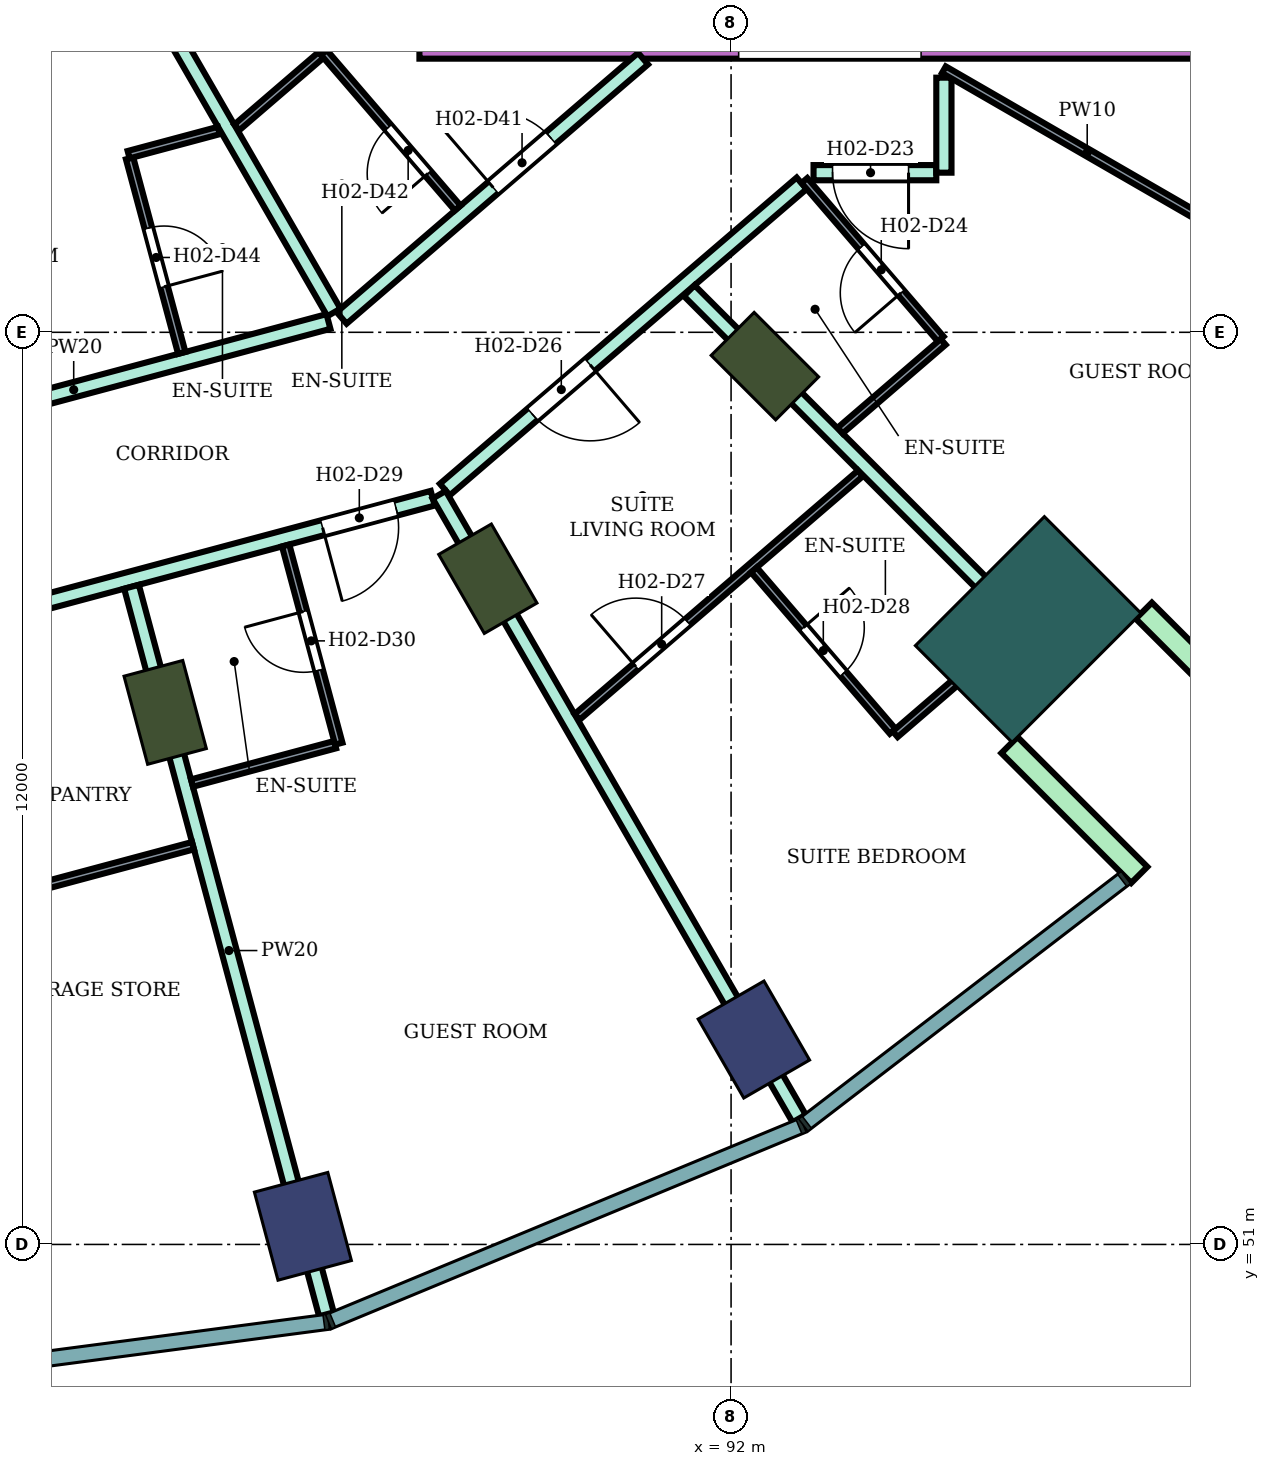
"""IFC4 building model, lengths in metres.
Left out: names, types, materials, properties, quantities, classifications, styles, units other than length and angle.
Written with IfcOpenShell. Run it as: python <this file> out.ifc"""

import sys

from ifc_helpers import new_model, si_unit, direction, frame, frame_2d, origin, origin_2d, place, context, subcontext, project, spatial, rectangle, extrude, element, fill, save


model = new_model("IFC4")
c1 = context("Model", 3, precision=1e-05, world=origin(), true_north=direction((0.0, 1.0)))
c2 = subcontext(c1, "Body", "Model", "MODEL_VIEW")
j1 = project(units=[si_unit("LENGTHUNIT", "METRE"), si_unit("PLANEANGLEUNIT", "RADIAN")], contexts=[c1])
p1 = place(None, origin())
s1 = spatial("IfcSite", under=j1, at=p1, CompositionType="ELEMENT")
p2 = place(p1, origin())
s2 = spatial("IfcBuilding", under=s1, at=p2, CompositionType="ELEMENT")
p3 = place(p2, frame((0.0, 0.0, 44.0)))
s3 = spatial("IfcBuildingStorey", under=s2, at=p3, CompositionType="ELEMENT", Elevation=44.0)
for number, where, z_axis, x_axis in (
    (1, (86.367, 51.238, 0.0), (0.0, 0.0, 1.0), (0.259, -0.966, 0.0)),
    (2, (92.3, 53.696, 0.0), (0.0, 0.0, 1.0), (0.5, -0.866, 0.0)),
):
    element("IfcColumn", number, at=place(p3, frame(where, z_axis=z_axis, x_axis=x_axis)), inside=s3, PredefinedType="COLUMN", context=c2, shape_type="SweptSolid", body=[
        extrude(rectangle(XDim=1.2, YDim=1.0, at=origin_2d()), origin(), (0.0, 0.0, 1.0), 3.8),
    ])
for number, where, z_axis, x_axis in (
    (3, (84.555, 58.0, 0.0), (0.0, 0.0, 1.0), (0.259, -0.966, 0.0)),
    (4, (88.8, 59.758, 0.0), (0.0, 0.0, 1.0), (0.5, -0.866, 0.0)),
    (5, (92.445, 62.555, 0.0), (0.0, 0.0, 1.0), (0.707, -0.707, 0.0)),
):
    element("IfcColumn", number, at=place(p3, frame(where, z_axis=z_axis, x_axis=x_axis)), inside=s3, PredefinedType="COLUMN", context=c2, shape_type="SweptSolid", body=[
        extrude(rectangle(XDim=1.2, YDim=0.8, at=origin_2d()), origin(), (0.0, 0.0, 1.0), 3.8),
    ])
p4 = place(p3, frame((95.91, 59.09, 0.0), z_axis=(0.0, 0.0, 1.0), x_axis=(0.707106781187, -0.707106781187, 0.0)))
e6 = element("IfcColumn", 6, at=p4, inside=s3, PredefinedType="COLUMN", context=c2, shape_type="SweptSolid", body=[
    extrude(rectangle(XDim=1.8, YDim=2.4, at=origin_2d()), origin(), (0.0, 0.0, 1.0), 3.8),
])
p5 = place(p3, frame((87.9, 67.0, 0.0), z_axis=(0.0, 0.0, 1.0), x_axis=(1.0, 0.0, 0.0)))
e7 = element("IfcWall", 7, at=p5, inside=s3, PredefinedType="SHEAR", context=c2, shape_type="SweptSolid", body=[
    extrude(rectangle(XDim=14.7, YDim=0.8, at=frame_2d((7.35, 0.0))), origin(), (0.0, 0.0, 1.0), 3.48),
])
p6 = place(p5, frame((4.2, 0.0, 0.0)))
e8 = element("IfcOpeningElement", 8, at=p6, cuts=e7, PredefinedType="OPENING", context=c2, shape_type="SweptSolid", body=[
    extrude(rectangle(XDim=2.4, YDim=2.4, at=frame_2d((1.2, 1.2))), frame((0.0, 0.41, 0.0), z_axis=(0.0, -1.0, 0.0), x_axis=(1.0, 0.0, 0.0)), (0.0, 0.0, 1.0), 0.82),
])
for number, where, z_axis, x_axis in (
    (9, (95.662, 57.57, 0.0), (0.0, 0.0, 1.0), (0.707, -0.707, 0.0)),
    (10, (97.43, 59.338, 0.0), (0.0, 0.0, 1.0), (0.707, -0.707, 0.0)),
):
    element("IfcWall", number, at=place(p3, frame(where, z_axis=z_axis, x_axis=x_axis)), inside=s3, PredefinedType="NOTDEFINED", context=c2, shape_type="SweptSolid", body=[
        extrude(rectangle(XDim=2.416, YDim=0.3, at=frame_2d((1.208, 0.0))), origin(), (0.0, 0.0, 1.0), 3.8),
    ])
p7 = place(p3, frame((80.0, 58.655, 0.0), z_axis=(0.0, 0.0, 1.0), x_axis=(0.965967338894, 0.258664068224, 0.0)))
e11 = element("IfcWall", 11, at=p7, inside=s3, PredefinedType="PARTITIONING", context=c2, shape_type="SweptSolid", body=[
    extrude(rectangle(XDim=8.36, YDim=0.2, at=frame_2d((4.18, 0.0))), origin(), (0.0, 0.0, 1.0), 3.35),
])
p8 = place(p7, frame((6.86, 0.0, 0.0)))
e12 = element("IfcOpeningElement", 12, at=p8, cuts=e11, PredefinedType="OPENING", context=c2, shape_type="SweptSolid", body=[
    extrude(rectangle(XDim=1.0, YDim=2.1, at=frame_2d((0.5, 1.05))), frame((0.0, 0.11, 0.0), z_axis=(0.0, -1.0, 0.0), x_axis=(1.0, 0.0, 0.0)), (0.0, 0.0, 1.0), 0.22),
])
p9 = place(p7, frame((1.675, 0.0, 0.0)))
e13 = element("IfcOpeningElement", 13, at=p9, cuts=e11, PredefinedType="OPENING", context=c2, shape_type="SweptSolid", body=[
    extrude(rectangle(XDim=0.9, YDim=2.1, at=frame_2d((0.45, 1.05))), frame((0.0, 0.11, 0.0), z_axis=(0.0, -1.0, 0.0), x_axis=(1.0, 0.0, 0.0)), (0.0, 0.0, 1.0), 0.22),
])
p10 = place(p3, frame((80.0, 61.346, 0.0), z_axis=(0.0, 0.0, 1.0), x_axis=(0.965924181808, 0.258825182312, 0.0)))
e14 = element("IfcWall", 14, at=p10, inside=s3, PredefinedType="PARTITIONING", context=c2, shape_type="SweptSolid", body=[
    extrude(rectangle(XDim=6.94, YDim=0.2, at=frame_2d((3.47, 0.0))), origin(), (0.0, 0.0, 1.0), 3.35),
])
p11 = place(p10, frame((0.55, 0.0, 0.0)))
e15 = element("IfcOpeningElement", 15, at=p11, cuts=e14, PredefinedType="OPENING", context=c2, shape_type="SweptSolid", body=[
    extrude(rectangle(XDim=1.0, YDim=2.1, at=frame_2d((0.5, 1.05))), frame((0.0, 0.11, 0.0), z_axis=(0.0, -1.0, 0.0), x_axis=(1.0, 0.0, 0.0)), (0.0, 0.0, 1.0), 0.22),
])
p12 = place(p3, frame((83.848, 68.332, 0.0), z_axis=(0.0, 0.0, 1.0), x_axis=(0.499919778085, -0.866071714975, 0.0)))
e16 = element("IfcWall", 16, at=p12, inside=s3, PredefinedType="PARTITIONING", context=c2, shape_type="SweptSolid", body=[
    extrude(rectangle(XDim=5.855, YDim=0.2, at=frame_2d((2.927, 0.0))), origin(), (0.0, 0.0, 1.0), 3.35),
])
p13 = place(p3, frame((84.112, 59.652, 0.0), z_axis=(0.0, 0.0, 1.0), x_axis=(0.258791091927, -0.965933315886, 0.0)))
e17 = element("IfcWall", 17, at=p13, inside=s3, PredefinedType="PARTITIONING", context=c2, shape_type="SweptSolid", body=[
    extrude(rectangle(XDim=9.909, YDim=0.2, at=frame_2d((4.955, 0.0))), origin(), (0.0, 0.0, 1.0), 3.35),
])
p14 = place(p3, frame((86.877, 63.189, 0.0), z_axis=(0.0, 0.0, 1.0), x_axis=(0.758164888471, 0.652062881853, 0.0)))
e18 = element("IfcWall", 18, at=p14, inside=s3, PredefinedType="PARTITIONING", context=c2, shape_type="SweptSolid", body=[
    extrude(rectangle(XDim=5.23, YDim=0.2, at=frame_2d((2.615, 0.0))), origin(), (0.0, 0.0, 1.0), 3.35),
])
p15 = place(p14, frame((2.63, 0.0, 0.0)))
e19 = element("IfcOpeningElement", 19, at=p15, cuts=e18, PredefinedType="OPENING", context=c2, shape_type="SweptSolid", body=[
    extrude(rectangle(XDim=1.0, YDim=2.1, at=frame_2d((0.5, 1.05))), frame((0.0, 0.11, 0.0), z_axis=(0.0, -1.0, 0.0), x_axis=(1.0, 0.0, 0.0)), (0.0, 0.0, 1.0), 0.22),
])
p16 = place(p3, frame((88.235, 60.931, 0.0), z_axis=(0.0, 0.0, 1.0), x_axis=(0.758799498714, 0.651324282329, 0.0)))
e20 = element("IfcWall", 20, at=p16, inside=s3, PredefinedType="PARTITIONING", context=c2, shape_type="SweptSolid", body=[
    extrude(rectangle(XDim=6.186, YDim=0.2, at=frame_2d((3.093, 0.0))), origin(), (0.0, 0.0, 1.0), 3.35),
])
p17 = place(p16, frame((1.519, 0.0, 0.0)))
e21 = element("IfcOpeningElement", 21, at=p17, cuts=e20, PredefinedType="OPENING", context=c2, shape_type="SweptSolid", body=[
    extrude(rectangle(XDim=1.0, YDim=2.1, at=frame_2d((0.5, 1.05))), frame((0.0, 0.11, 0.0), z_axis=(0.0, -1.0, 0.0), x_axis=(1.0, 0.0, 0.0)), (0.0, 0.0, 1.0), 0.22),
])
p18 = place(p3, frame((88.159, 60.863, 0.0), z_axis=(0.0, 0.0, 1.0), x_axis=(0.499897184548, -0.866084756177, 0.0)))
e22 = element("IfcWall", 22, at=p18, inside=s3, PredefinedType="PARTITIONING", context=c2, shape_type="SweptSolid", body=[
    extrude(rectangle(XDim=9.475, YDim=0.2, at=frame_2d((4.737, 0.0))), origin(), (0.0, 0.0, 1.0), 3.35),
])
p19 = place(p3, frame((91.449, 63.548, 0.0), z_axis=(0.0, 0.0, 1.0), x_axis=(0.706984810649, -0.707228730688, 0.0)))
e23 = element("IfcWall", 23, at=p19, inside=s3, PredefinedType="PARTITIONING", context=c2, shape_type="SweptSolid", body=[
    extrude(rectangle(XDim=7.006, YDim=0.2, at=frame_2d((3.503, 0.0))), origin(), (0.0, 0.0, 1.0), 3.35),
])
p20 = place(p3, frame((93.085, 65.1, 0.0), z_axis=(0.0, 0.0, 1.0), x_axis=(1.0, 0.0, 0.0)))
e24 = element("IfcWall", 24, at=p20, inside=s3, PredefinedType="PARTITIONING", context=c2, shape_type="SweptSolid", body=[
    extrude(rectangle(XDim=1.615, YDim=0.2, at=frame_2d((0.808, 0.0))), origin(), (0.0, 0.0, 1.0), 3.35),
])
p21 = place(p20, frame((0.25, 0.0, 0.0)))
e25 = element("IfcOpeningElement", 25, at=p21, cuts=e24, PredefinedType="OPENING", context=c2, shape_type="SweptSolid", body=[
    extrude(rectangle(XDim=1.0, YDim=2.1, at=frame_2d((0.5, 1.05))), frame((0.0, 0.11, 0.0), z_axis=(0.0, -1.0, 0.0), x_axis=(1.0, 0.0, 0.0)), (0.0, 0.0, 1.0), 0.22),
])
p22 = place(p3, frame((94.8, 65.1, 0.0), z_axis=(0.0, 0.0, 1.0), x_axis=(0.0, 1.0, 0.0)))
e26 = element("IfcWall", 26, at=p22, inside=s3, PredefinedType="PARTITIONING", context=c2, shape_type="SweptSolid", body=[
    extrude(rectangle(XDim=1.25, YDim=0.2, at=frame_2d((0.625, 0.0))), origin(), (0.0, 0.0, 1.0), 3.35),
])
p23 = place(p3, frame((80.106, 54.956, 0.0), z_axis=(0.0, 0.0, 1.0), x_axis=(0.965910666284, 0.258875616386, 0.0)))
e27 = element("IfcWall", 27, at=p23, inside=s3, PredefinedType="PARTITIONING", context=c2, shape_type="SweptSolid", body=[
    extrude(rectangle(XDim=4.985, YDim=0.1, at=frame_2d((2.493, 0.0))), origin(), (0.0, 0.0, 1.0), 3.35),
])
p24 = place(p23, frame((2.038, 0.0, 0.0)))
e28 = element("IfcOpeningElement", 28, at=p24, cuts=e27, PredefinedType="OPENING", context=c2, shape_type="SweptSolid", body=[
    extrude(rectangle(XDim=0.9, YDim=2.1, at=frame_2d((0.45, 1.05))), frame((0.0, 0.06, 0.0), z_axis=(0.0, -1.0, 0.0), x_axis=(1.0, 0.0, 0.0)), (0.0, 0.0, 1.0), 0.12),
])
p25 = place(p3, frame((84.087, 65.289, 0.0), z_axis=(0.0, 0.0, 1.0), x_axis=(0.258929459649, -0.965896234037, 0.0)))
e29 = element("IfcWall", 29, at=p25, inside=s3, PredefinedType="PARTITIONING", context=c2, shape_type="SweptSolid", body=[
    extrude(rectangle(XDim=2.65, YDim=0.1, at=frame_2d((1.325, 0.0))), origin(), (0.0, 0.0, 1.0), 3.35),
])
p26 = place(p25, frame((0.95, 0.0, 0.0)))
e30 = element("IfcOpeningElement", 30, at=p26, cuts=e29, PredefinedType="OPENING", context=c2, shape_type="SweptSolid", body=[
    extrude(rectangle(XDim=0.8, YDim=2.1, at=frame_2d((0.4, 1.05))), frame((0.0, 0.06, 0.0), z_axis=(0.0, -1.0, 0.0), x_axis=(1.0, 0.0, 0.0)), (0.0, 0.0, 1.0), 0.12),
])
p27 = place(p3, frame((84.074, 65.337, 0.0), z_axis=(0.0, 0.0, 1.0), x_axis=(0.965914351064, 0.258861867428, 0.0)))
e31 = element("IfcWall", 31, at=p27, inside=s3, PredefinedType="PARTITIONING", context=c2, shape_type="SweptSolid", body=[
    extrude(rectangle(XDim=1.229, YDim=0.1, at=frame_2d((0.615, 0.0))), origin(), (0.0, 0.0, 1.0), 3.35),
])
p28 = place(p3, frame((84.908, 57.07, 0.0), z_axis=(0.0, 0.0, 1.0), x_axis=(0.965853538138, 0.25908867761, 0.0)))
e32 = element("IfcWall", 32, at=p28, inside=s3, PredefinedType="PARTITIONING", context=c2, shape_type="SweptSolid", body=[
    extrude(rectangle(XDim=1.95, YDim=0.1, at=frame_2d((0.975, 0.0))), origin(), (0.0, 0.0, 1.0), 3.35),
])
p29 = place(p3, frame((85.497, 65.696, 0.0), z_axis=(0.0, 0.0, 1.0), x_axis=(0.75817032582, 0.652056559698, 0.0)))
e33 = element("IfcWall", 33, at=p29, inside=s3, PredefinedType="PARTITIONING", context=c2, shape_type="SweptSolid", body=[
    extrude(rectangle(XDim=1.461, YDim=0.1, at=frame_2d((0.73, 0.0))), origin(), (0.0, 0.0, 1.0), 3.35),
])
p30 = place(p3, frame((86.14, 60.196, 0.0), z_axis=(0.0, 0.0, 1.0), x_axis=(0.258945475746, -0.965891940432, 0.0)))
e34 = element("IfcWall", 34, at=p30, inside=s3, PredefinedType="PARTITIONING", context=c2, shape_type="SweptSolid", body=[
    extrude(rectangle(XDim=2.7, YDim=0.1, at=frame_2d((1.35, 0.0))), origin(), (0.0, 0.0, 1.0), 3.35),
])
p31 = place(p30, frame((0.9, 0.0, 0.0)))
e35 = element("IfcOpeningElement", 35, at=p31, cuts=e34, PredefinedType="OPENING", context=c2, shape_type="SweptSolid", body=[
    extrude(rectangle(XDim=0.8, YDim=2.1, at=frame_2d((0.4, 1.05))), frame((0.0, 0.06, 0.0), z_axis=(0.0, -1.0, 0.0), x_axis=(1.0, 0.0, 0.0)), (0.0, 0.0, 1.0), 0.12),
])
p32 = place(p3, frame((86.643, 66.681, 0.0), z_axis=(0.0, 0.0, 1.0), x_axis=(0.652264876065, -0.757991115682, 0.0)))
e36 = element("IfcWall", 36, at=p32, inside=s3, PredefinedType="PARTITIONING", context=c2, shape_type="SweptSolid", body=[
    extrude(rectangle(XDim=2.699, YDim=0.1, at=frame_2d((1.35, 0.0))), origin(), (0.0, 0.0, 1.0), 3.35),
])
p33 = place(p32, frame((1.3, 0.0, 0.0)))
e37 = element("IfcOpeningElement", 37, at=p33, cuts=e36, PredefinedType="OPENING", context=c2, shape_type="SweptSolid", body=[
    extrude(rectangle(XDim=0.8, YDim=2.1, at=frame_2d((0.4, 1.05))), frame((0.0, 0.06, 0.0), z_axis=(0.0, -1.0, 0.0), x_axis=(1.0, 0.0, 0.0)), (0.0, 0.0, 1.0), 0.12),
])
p34 = place(p3, frame((89.974, 57.94, 0.0), z_axis=(0.0, 0.0, 1.0), x_axis=(0.75821417454, 0.652005571699, 0.0)))
e38 = element("IfcWall", 38, at=p34, inside=s3, PredefinedType="PARTITIONING", context=c2, shape_type="SweptSolid", body=[
    extrude(rectangle(XDim=4.915, YDim=0.1, at=frame_2d((2.457, 0.0))), origin(), (0.0, 0.0, 1.0), 3.35),
])
p35 = place(p34, frame((1.017, 0.0, 0.0)))
e39 = element("IfcOpeningElement", 39, at=p35, cuts=e38, PredefinedType="OPENING", context=c2, shape_type="SweptSolid", body=[
    extrude(rectangle(XDim=0.9, YDim=2.1, at=frame_2d((0.45, 1.05))), frame((0.0, 0.06, 0.0), z_axis=(0.0, -1.0, 0.0), x_axis=(1.0, 0.0, 0.0)), (0.0, 0.0, 1.0), 0.12),
])
p36 = place(p3, frame((92.301, 59.874, 0.0), z_axis=(0.0, 0.0, 1.0), x_axis=(0.652061320562, -0.758166231262, 0.0)))
e40 = element("IfcWall", 40, at=p36, inside=s3, PredefinedType="PARTITIONING", context=c2, shape_type="SweptSolid", body=[
    extrude(rectangle(XDim=2.8, YDim=0.1, at=frame_2d((1.4, 0.0))), origin(), (0.0, 0.0, 1.0), 3.35),
])
p37 = place(p36, frame((1.0, 0.0, 0.0)))
e41 = element("IfcOpeningElement", 41, at=p37, cuts=e40, PredefinedType="OPENING", context=c2, shape_type="SweptSolid", body=[
    extrude(rectangle(XDim=0.8, YDim=2.1, at=frame_2d((0.4, 1.05))), frame((0.0, 0.06, 0.0), z_axis=(0.0, -1.0, 0.0), x_axis=(1.0, 0.0, 0.0)), (0.0, 0.0, 1.0), 0.12),
])
p38 = place(p3, frame((92.965, 64.997, 0.0), z_axis=(0.0, 0.0, 1.0), x_axis=(0.652069888227, -0.758158862553, 0.0)))
e42 = element("IfcWall", 42, at=p38, inside=s3, PredefinedType="PARTITIONING", context=c2, shape_type="SweptSolid", body=[
    extrude(rectangle(XDim=2.75, YDim=0.1, at=frame_2d((1.375, 0.0))), origin(), (0.0, 0.0, 1.0), 3.35),
])
p39 = place(p38, frame((1.15, 0.0, 0.0)))
e43 = element("IfcOpeningElement", 43, at=p39, cuts=e42, PredefinedType="OPENING", context=c2, shape_type="SweptSolid", body=[
    extrude(rectangle(XDim=0.8, YDim=2.1, at=frame_2d((0.4, 1.05))), frame((0.0, 0.06, 0.0), z_axis=(0.0, -1.0, 0.0), x_axis=(1.0, 0.0, 0.0)), (0.0, 0.0, 1.0), 0.12),
])
p40 = place(p3, frame((93.435, 61.707, 0.0), z_axis=(0.0, 0.0, 1.0), x_axis=(0.758070495124, 0.652172618578, 0.0)))
e44 = element("IfcWall", 44, at=p40, inside=s3, PredefinedType="PARTITIONING", context=c2, shape_type="SweptSolid", body=[
    extrude(rectangle(XDim=1.789, YDim=0.1, at=frame_2d((0.895, 0.0))), origin(), (0.0, 0.0, 1.0), 3.35),
])
p41 = place(p3, frame((94.159, 57.713, 0.0), z_axis=(0.0, 0.0, 1.0), x_axis=(0.75802950812, 0.652220257903, 0.0)))
e45 = element("IfcWall", 45, at=p41, inside=s3, PredefinedType="PARTITIONING", context=c2, shape_type="SweptSolid", body=[
    extrude(rectangle(XDim=2.109, YDim=0.1, at=frame_2d((1.054, 0.0))), origin(), (0.0, 0.0, 1.0), 3.35),
])
p42 = place(p3, frame((94.8, 66.455, 0.0), z_axis=(0.0, 0.0, 1.0), x_axis=(0.86602264145, -0.500004784474, 0.0)))
e46 = element("IfcWall", 46, at=p42, inside=s3, PredefinedType="PARTITIONING", context=c2, shape_type="SweptSolid", body=[
    extrude(rectangle(XDim=8.708, YDim=0.1, at=frame_2d((4.354, 0.0))), origin(), (0.0, 0.0, 1.0), 3.35),
])
p43 = place(p42, frame((3.879, 0.0, 0.0)))
e47 = element("IfcOpeningElement", 47, at=p43, cuts=e46, PredefinedType="OPENING", context=c2, shape_type="SweptSolid", body=[
    extrude(rectangle(XDim=0.9, YDim=2.1, at=frame_2d((0.45, 1.05))), frame((0.0, 0.06, 0.0), z_axis=(0.0, -1.0, 0.0), x_axis=(1.0, 0.0, 0.0)), (0.0, 0.0, 1.0), 0.12),
])
p44 = place(p21, frame((1.0, 0.0, 0.0), z_axis=(0.0, 0.0, 1.0), x_axis=(-1.0, 0.0, 0.0)))
e48 = element("IfcDoor", 48, at=p44, inside=s3, OperationType="SINGLE_SWING_LEFT", PredefinedType="DOOR", context=c2, shape_type="SweptSolid", body=[
    extrude(rectangle(XDim=1.0, YDim=2.1, at=frame_2d((0.5, 1.05))), frame((0.0, 0.025, 0.0), z_axis=(0.0, -1.0, 0.0), x_axis=(1.0, 0.0, 0.0)), (0.0, 0.0, 1.0), 0.05),
])
fill(e25, e48)
p45 = place(p39, frame((0.8, 0.0, 0.0), z_axis=(0.0, 0.0, 1.0), x_axis=(-1.0, 0.0, 0.0)))
e49 = element("IfcDoor", 49, at=p45, inside=s3, OperationType="SINGLE_SWING_LEFT", PredefinedType="DOOR", context=c2, shape_type="SweptSolid", body=[
    extrude(rectangle(XDim=0.8, YDim=2.1, at=frame_2d((0.4, 1.05))), frame((0.0, 0.025, 0.0), z_axis=(0.0, -1.0, 0.0), x_axis=(1.0, 0.0, 0.0)), (0.0, 0.0, 1.0), 0.05),
])
fill(e43, e49)
p46 = place(p17, frame((1.0, 0.0, 0.0), z_axis=(0.0, 0.0, 1.0), x_axis=(-1.0, 0.0, 0.0)))
e50 = element("IfcDoor", 50, at=p46, inside=s3, OperationType="SINGLE_SWING_LEFT", PredefinedType="DOOR", context=c2, shape_type="SweptSolid", body=[
    extrude(rectangle(XDim=1.0, YDim=2.1, at=frame_2d((0.5, 1.05))), frame((0.0, 0.025, 0.0), z_axis=(0.0, -1.0, 0.0), x_axis=(1.0, 0.0, 0.0)), (0.0, 0.0, 1.0), 0.05),
])
fill(e21, e50)
p47 = place(p35, origin())
e51 = element("IfcDoor", 51, at=p47, inside=s3, OperationType="SINGLE_SWING_LEFT", PredefinedType="DOOR", context=c2, shape_type="SweptSolid", body=[
    extrude(rectangle(XDim=0.9, YDim=2.1, at=frame_2d((0.45, 1.05))), frame((0.0, 0.025, 0.0), z_axis=(0.0, -1.0, 0.0), x_axis=(1.0, 0.0, 0.0)), (0.0, 0.0, 1.0), 0.05),
])
fill(e39, e51)
p48 = place(p37, origin())
e52 = element("IfcDoor", 52, at=p48, inside=s3, OperationType="SINGLE_SWING_LEFT", PredefinedType="DOOR", context=c2, shape_type="SweptSolid", body=[
    extrude(rectangle(XDim=0.8, YDim=2.1, at=frame_2d((0.4, 1.05))), frame((0.0, 0.025, 0.0), z_axis=(0.0, -1.0, 0.0), x_axis=(1.0, 0.0, 0.0)), (0.0, 0.0, 1.0), 0.05),
])
fill(e41, e52)
p49 = place(p8, frame((1.0, 0.0, 0.0), z_axis=(0.0, 0.0, 1.0), x_axis=(-1.0, 0.0, 0.0)))
e53 = element("IfcDoor", 53, at=p49, inside=s3, OperationType="SINGLE_SWING_RIGHT", PredefinedType="DOOR", context=c2, shape_type="SweptSolid", body=[
    extrude(rectangle(XDim=1.0, YDim=2.1, at=frame_2d((0.5, 1.05))), frame((0.0, 0.025, 0.0), z_axis=(0.0, -1.0, 0.0), x_axis=(1.0, 0.0, 0.0)), (0.0, 0.0, 1.0), 0.05),
])
fill(e12, e53)
p50 = place(p31, frame((0.8, 0.0, 0.0), z_axis=(0.0, 0.0, 1.0), x_axis=(-1.0, 0.0, 0.0)))
e54 = element("IfcDoor", 54, at=p50, inside=s3, OperationType="SINGLE_SWING_RIGHT", PredefinedType="DOOR", context=c2, shape_type="SweptSolid", body=[
    extrude(rectangle(XDim=0.8, YDim=2.1, at=frame_2d((0.4, 1.05))), frame((0.0, 0.025, 0.0), z_axis=(0.0, -1.0, 0.0), x_axis=(1.0, 0.0, 0.0)), (0.0, 0.0, 1.0), 0.05),
])
fill(e35, e54)
p51 = place(p15, origin())
e55 = element("IfcDoor", 55, at=p51, inside=s3, OperationType="SINGLE_SWING_LEFT", PredefinedType="DOOR", context=c2, shape_type="SweptSolid", body=[
    extrude(rectangle(XDim=1.0, YDim=2.1, at=frame_2d((0.5, 1.05))), frame((0.0, 0.025, 0.0), z_axis=(0.0, -1.0, 0.0), x_axis=(1.0, 0.0, 0.0)), (0.0, 0.0, 1.0), 0.05),
])
fill(e19, e55)
p52 = place(p33, frame((0.8, 0.0, 0.0), z_axis=(0.0, 0.0, 1.0), x_axis=(-1.0, 0.0, 0.0)))
e56 = element("IfcDoor", 56, at=p52, inside=s3, OperationType="SINGLE_SWING_LEFT", PredefinedType="DOOR", context=c2, shape_type="SweptSolid", body=[
    extrude(rectangle(XDim=0.8, YDim=2.1, at=frame_2d((0.4, 1.05))), frame((0.0, 0.025, 0.0), z_axis=(0.0, -1.0, 0.0), x_axis=(1.0, 0.0, 0.0)), (0.0, 0.0, 1.0), 0.05),
])
fill(e37, e56)
p53 = place(p26, origin())
e57 = element("IfcDoor", 57, at=p53, inside=s3, OperationType="SINGLE_SWING_RIGHT", PredefinedType="DOOR", context=c2, shape_type="SweptSolid", body=[
    extrude(rectangle(XDim=0.8, YDim=2.1, at=frame_2d((0.4, 1.05))), frame((0.0, 0.025, 0.0), z_axis=(0.0, -1.0, 0.0), x_axis=(1.0, 0.0, 0.0)), (0.0, 0.0, 1.0), 0.05),
])
fill(e30, e57)
save(model, sys.argv[1])
